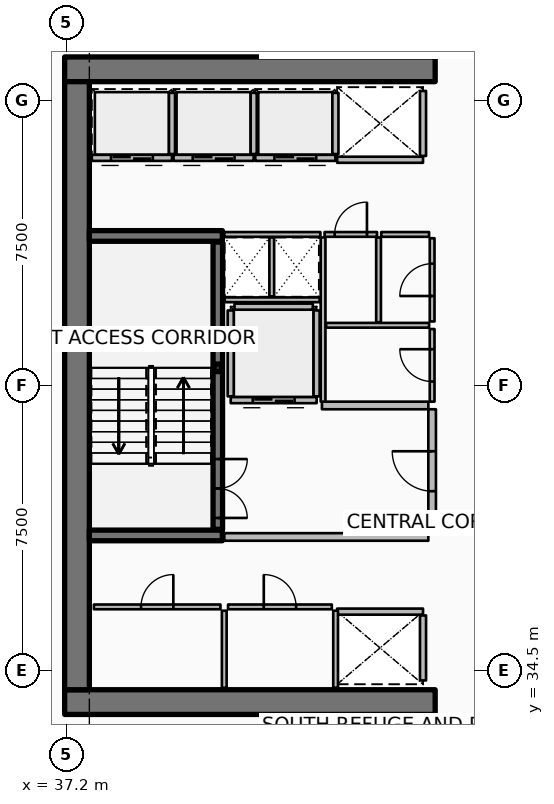
"""IFC4 building model, lengths in metres.
Left out: names, types, materials, properties, quantities, classifications, styles, units other than length and angle.
Written with IfcOpenShell. Run it as: python <this file> out.ifc"""

import sys

from ifc_helpers import new_model, si_unit, direction, frame, frame_2d, origin, origin_2d, place, context, subcontext, project, spatial, rectangle, hollow_rectangle, extrude, element, fill, save


model = new_model("IFC4")
c1 = context("Model", 3, precision=1e-05, world=origin(), true_north=direction((0.0, 1.0)))
c2 = subcontext(c1, "Body", "Model", "MODEL_VIEW")
j1 = project(units=[si_unit("LENGTHUNIT", "METRE"), si_unit("PLANEANGLEUNIT", "RADIAN")], contexts=[c1])
p1 = place(None, origin())
s1 = spatial("IfcSite", under=j1, at=p1, CompositionType="ELEMENT")
p2 = place(p1, origin())
s2 = spatial("IfcBuilding", under=s1, at=p2, CompositionType="ELEMENT")
p3 = place(p2, frame((0.0, 0.0, 225.3)))
s3 = spatial("IfcBuildingStorey", under=s2, at=p3, CompositionType="ELEMENT", Elevation=225.3)
for number, where, z_axis, x_axis in (
    (1, (37.15, 33.675, 0.0), (0.0, 0.0, 1.0), (1.0, 0.0, 0.0)),
    (2, (37.15, 50.325, 0.0), (0.0, 0.0, 1.0), (1.0, 0.0, 0.0)),
):
    element("IfcWall", number, at=place(p3, frame(where, z_axis=z_axis, x_axis=x_axis)), inside=s3, PredefinedType="SHEAR", context=c2, shape_type="SweptSolid", body=[
        extrude(rectangle(XDim=9.75, YDim=0.65, at=frame_2d((4.875, 0.0))), origin(), (0.0, 0.0, 1.0), 6.6),
    ])
p4 = place(p3, frame((37.475, 34.0, 0.0), z_axis=(0.0, 0.0, 1.0), x_axis=(0.0, 1.0, 0.0)))
e3 = element("IfcWall", 3, at=p4, inside=s3, PredefinedType="SHEAR", context=c2, shape_type="SweptSolid", body=[
    extrude(rectangle(XDim=16.0, YDim=0.65, at=frame_2d((8.0, 0.0))), origin(), (0.0, 0.0, 1.0), 6.6),
])
for number, where, z_axis, x_axis in (
    (4, (37.8, 38.06, 0.0), (0.0, 0.0, 1.0), (1.0, 0.0, 0.0)),
    (5, (37.8, 45.94, 0.0), (0.0, 0.0, 1.0), (1.0, 0.0, 0.0)),
):
    element("IfcWall", number, at=place(p3, frame(where, z_axis=z_axis, x_axis=x_axis)), inside=s3, PredefinedType="SHEAR", context=c2, shape_type="SweptSolid", body=[
        extrude(rectangle(XDim=3.5, YDim=0.28, at=frame_2d((1.75, 0.0))), origin(), (0.0, 0.0, 1.0), 6.6),
    ])
p5 = place(p3, frame((41.18, 42.47, 0.0), z_axis=(0.0, 0.0, 1.0), x_axis=(1.0, 0.0, 0.0)))
e6 = element("IfcColumn", 6, at=p5, inside=s3, PredefinedType="COLUMN", context=c2, shape_type="SweptSolid", body=[
    extrude(hollow_rectangle(XDim=0.2, YDim=0.2, WallThickness=0.01, InnerFilletRadius=0.01, OuterFilletRadius=0.02, at=origin_2d()), origin(), (0.0, 0.0, 1.0), 1.445),
])
p6 = place(p3, frame((41.18, 43.17, 0.0), z_axis=(0.0, 0.0, 1.0), x_axis=(1.0, 0.0, 0.0)))
e7 = element("IfcColumn", 7, at=p6, inside=s3, PredefinedType="COLUMN", context=c2, shape_type="SweptSolid", body=[
    extrude(hollow_rectangle(XDim=0.2, YDim=0.2, WallThickness=0.01, InnerFilletRadius=0.01, OuterFilletRadius=0.02, at=origin_2d()), origin(), (0.0, 0.0, 1.0), 4.745),
])
p7 = place(p3, frame((41.18, 38.22, 0.0), z_axis=(0.0, 0.0, 1.0), x_axis=(0.0, 1.0, 0.0)))
e8 = element("IfcWall", 8, at=p7, inside=s3, PredefinedType="SOLIDWALL", context=c2, shape_type="SweptSolid", body=[
    extrude(rectangle(XDim=7.56, YDim=0.25, at=frame_2d((3.78, 0.0))), origin(), (0.0, 0.0, 1.0), 6.28),
])
p8 = place(p7, frame((0.3, 0.0, 0.0)))
e9 = element("IfcOpeningElement", 9, at=p8, cuts=e8, PredefinedType="OPENING", context=c2, shape_type="SweptSolid", body=[
    extrude(rectangle(XDim=1.55, YDim=2.15, at=frame_2d((0.775, 1.075))), frame((0.0, 0.135, 0.0), z_axis=(0.0, -1.0, 0.0), x_axis=(1.0, 0.0, 0.0)), (0.0, 0.0, 1.0), 0.27),
])
p9 = place(p3, frame((39.975, 47.995, 0.0), z_axis=(0.0, 0.0, 1.0), x_axis=(-1.0, 0.0, 0.0)))
e10 = element("IfcWall", 10, at=p9, inside=s3, PredefinedType="PARTITIONING", context=c2, shape_type="SweptSolid", body=[
    extrude(rectangle(XDim=2.11, YDim=0.16, at=frame_2d((1.055, 0.0))), origin(), (0.0, 0.0, 1.0), 6.28),
])
p10 = place(p9, frame((0.505, 0.0, 0.0)))
e11 = element("IfcOpeningElement", 11, at=p10, cuts=e10, PredefinedType="OPENING", context=c2, shape_type="SweptSolid", body=[
    extrude(rectangle(XDim=1.1, YDim=2.1, at=frame_2d((0.55, 1.05))), frame((0.0, 0.09, 0.0), z_axis=(0.0, -1.0, 0.0), x_axis=(1.0, 0.0, 0.0)), (0.0, 0.0, 1.0), 0.18),
])
p11 = place(p3, frame((39.975, 48.095, 0.0), z_axis=(0.0, 0.0, 1.0), x_axis=(0.0, 1.0, 0.0)))
e12 = element("IfcWall", 12, at=p11, inside=s3, PredefinedType="PARTITIONING", context=c2, shape_type="SweptSolid", body=[
    extrude(rectangle(XDim=1.61, YDim=0.16, at=frame_2d((0.805, 0.0))), origin(), (0.0, 0.0, 1.0), 6.28),
])
p12 = place(p3, frame((42.125, 47.995, 0.0), z_axis=(0.0, 0.0, 1.0), x_axis=(-1.0, 0.0, 0.0)))
e13 = element("IfcWall", 13, at=p12, inside=s3, PredefinedType="PARTITIONING", context=c2, shape_type="SweptSolid", body=[
    extrude(rectangle(XDim=2.11, YDim=0.16, at=frame_2d((1.055, 0.0))), origin(), (0.0, 0.0, 1.0), 6.28),
])
p13 = place(p12, frame((0.505, 0.0, 0.0)))
e14 = element("IfcOpeningElement", 14, at=p13, cuts=e13, PredefinedType="OPENING", context=c2, shape_type="SweptSolid", body=[
    extrude(rectangle(XDim=1.1, YDim=2.1, at=frame_2d((0.55, 1.05))), frame((0.0, 0.09, 0.0), z_axis=(0.0, -1.0, 0.0), x_axis=(1.0, 0.0, 0.0)), (0.0, 0.0, 1.0), 0.18),
])
p14 = place(p3, frame((42.125, 48.095, 0.0), z_axis=(0.0, 0.0, 1.0), x_axis=(0.0, 1.0, 0.0)))
e15 = element("IfcWall", 15, at=p14, inside=s3, PredefinedType="PARTITIONING", context=c2, shape_type="SweptSolid", body=[
    extrude(rectangle(XDim=1.61, YDim=0.16, at=frame_2d((0.805, 0.0))), origin(), (0.0, 0.0, 1.0), 6.28),
])
p15 = place(p3, frame((44.275, 47.995, 0.0), z_axis=(0.0, 0.0, 1.0), x_axis=(-1.0, 0.0, 0.0)))
e16 = element("IfcWall", 16, at=p15, inside=s3, PredefinedType="PARTITIONING", context=c2, shape_type="SweptSolid", body=[
    extrude(rectangle(XDim=2.11, YDim=0.16, at=frame_2d((1.055, 0.0))), origin(), (0.0, 0.0, 1.0), 6.28),
])
p16 = place(p15, frame((0.505, 0.0, 0.0)))
e17 = element("IfcOpeningElement", 17, at=p16, cuts=e16, PredefinedType="OPENING", context=c2, shape_type="SweptSolid", body=[
    extrude(rectangle(XDim=1.1, YDim=2.1, at=frame_2d((0.55, 1.05))), frame((0.0, 0.09, 0.0), z_axis=(0.0, -1.0, 0.0), x_axis=(1.0, 0.0, 0.0)), (0.0, 0.0, 1.0), 0.18),
])
p17 = place(p3, frame((44.275, 48.095, 0.0), z_axis=(0.0, 0.0, 1.0), x_axis=(0.0, 1.0, 0.0)))
e18 = element("IfcWall", 18, at=p17, inside=s3, PredefinedType="PARTITIONING", context=c2, shape_type="SweptSolid", body=[
    extrude(rectangle(XDim=1.61, YDim=0.16, at=frame_2d((0.805, 0.0))), origin(), (0.0, 0.0, 1.0), 6.28),
])
p18 = place(p3, frame((46.58, 47.945, 0.0), z_axis=(0.0, 0.0, 1.0), x_axis=(-1.0, 0.0, 0.0)))
e19 = element("IfcWall", 19, at=p18, inside=s3, PredefinedType="PARTITIONING", context=c2, shape_type="SweptSolid", body=[
    extrude(rectangle(XDim=2.26, YDim=0.16, at=frame_2d((1.13, 0.0))), origin(), (0.0, 0.0, 1.0), 6.28),
])
p19 = place(p3, frame((46.58, 48.045, 0.0), z_axis=(0.0, 0.0, 1.0), x_axis=(0.0, 1.0, 0.0)))
e20 = element("IfcWall", 20, at=p19, inside=s3, PredefinedType="PARTITIONING", context=c2, shape_type="SweptSolid", body=[
    extrude(rectangle(XDim=1.71, YDim=0.16, at=frame_2d((0.855, 0.0))), origin(), (0.0, 0.0, 1.0), 6.28),
])
p20 = place(p3, frame((44.32, 36.055, 0.0), z_axis=(0.0, 0.0, 1.0), x_axis=(1.0, 0.0, 0.0)))
e21 = element("IfcWall", 21, at=p20, inside=s3, PredefinedType="PARTITIONING", context=c2, shape_type="SweptSolid", body=[
    extrude(rectangle(XDim=2.26, YDim=0.16, at=frame_2d((1.13, 0.0))), origin(), (0.0, 0.0, 1.0), 6.28),
])
p21 = place(p3, frame((46.58, 34.245, 0.0), z_axis=(0.0, 0.0, 1.0), x_axis=(0.0, 1.0, 0.0)))
e22 = element("IfcWall", 22, at=p21, inside=s3, PredefinedType="PARTITIONING", context=c2, shape_type="SweptSolid", body=[
    extrude(rectangle(XDim=1.71, YDim=0.16, at=frame_2d((0.855, 0.0))), origin(), (0.0, 0.0, 1.0), 6.28),
])
p22 = place(p3, frame((43.78, 41.62, 0.0), z_axis=(0.0, 0.0, 1.0), x_axis=(-1.0, 0.0, 0.0)))
e23 = element("IfcWall", 23, at=p22, inside=s3, PredefinedType="PARTITIONING", context=c2, shape_type="SweptSolid", body=[
    extrude(rectangle(XDim=2.26, YDim=0.16, at=frame_2d((1.13, 0.0))), origin(), (0.0, 0.0, 1.0), 6.28),
])
p23 = place(p22, frame((0.58, 0.0, 0.0)))
e24 = element("IfcOpeningElement", 24, at=p23, cuts=e23, PredefinedType="OPENING", context=c2, shape_type="SweptSolid", body=[
    extrude(rectangle(XDim=1.1, YDim=2.1, at=frame_2d((0.55, 1.05))), frame((0.0, 0.09, 0.0), z_axis=(0.0, -1.0, 0.0), x_axis=(1.0, 0.0, 0.0)), (0.0, 0.0, 1.0), 0.18),
])
for number, where, z_axis, x_axis in (
    (25, (43.78, 41.72, 0.0), (0.0, 0.0, 1.0), (0.0, 1.0, 0.0)),
    (26, (41.52, 41.72, 0.0), (0.0, 0.0, 1.0), (0.0, 1.0, 0.0)),
):
    element("IfcWall", number, at=place(p3, frame(where, z_axis=z_axis, x_axis=x_axis)), inside=s3, PredefinedType="PARTITIONING", context=c2, shape_type="SweptSolid", body=[
        extrude(rectangle(XDim=2.26, YDim=0.16, at=frame_2d((1.13, 0.0))), origin(), (0.0, 0.0, 1.0), 6.28),
    ])
p24 = place(p3, frame((41.62, 44.08, 0.0), z_axis=(0.0, 0.0, 1.0), x_axis=(1.0, 0.0, 0.0)))
e27 = element("IfcWall", 27, at=p24, inside=s3, PredefinedType="PARTITIONING", context=c2, shape_type="SweptSolid", body=[
    extrude(rectangle(XDim=2.06, YDim=0.16, at=frame_2d((1.03, 0.0))), origin(), (0.0, 0.0, 1.0), 6.28),
])
for number, where, z_axis, x_axis in (
    (28, (44.28, 34.05, 0.0), (0.0, 0.0, 1.0), (0.0, 1.0, 0.0)),
    (29, (41.35, 34.05, 0.0), (0.0, 0.0, 1.0), (0.0, 1.0, 0.0)),
):
    element("IfcWall", number, at=place(p3, frame(where, z_axis=z_axis, x_axis=x_axis)), inside=s3, PredefinedType="PARTITIONING", context=c2, shape_type="SweptSolid", body=[
        extrude(rectangle(XDim=2.03, YDim=0.125, at=frame_2d((1.015, 0.0))), origin(), (0.0, 0.0, 1.0), 5.72),
    ])
p25 = place(p3, frame((37.92, 36.18, 0.0), z_axis=(0.0, 0.0, 1.0), x_axis=(1.0, 0.0, 0.0)))
e30 = element("IfcWall", 30, at=p25, inside=s3, PredefinedType="PARTITIONING", context=c2, shape_type="SweptSolid", body=[
    extrude(rectangle(XDim=3.33, YDim=0.125, at=frame_2d((1.665, 0.0))), origin(), (0.0, 0.0, 1.0), 5.72),
])
p26 = place(p25, frame((1.24, 0.0, 0.0)))
e31 = element("IfcOpeningElement", 31, at=p26, cuts=e30, PredefinedType="OPENING", context=c2, shape_type="SweptSolid", body=[
    extrude(rectangle(XDim=0.85, YDim=2.06, at=frame_2d((0.425, 1.03))), frame((0.0, 0.073, 0.0), z_axis=(0.0, -1.0, 0.0), x_axis=(1.0, 0.0, 0.0)), (0.0, 0.0, 1.0), 0.145),
])
p27 = place(p3, frame((41.45, 36.18, 0.0), z_axis=(0.0, 0.0, 1.0), x_axis=(1.0, 0.0, 0.0)))
e32 = element("IfcWall", 32, at=p27, inside=s3, PredefinedType="PARTITIONING", context=c2, shape_type="SweptSolid", body=[
    extrude(rectangle(XDim=2.73, YDim=0.125, at=frame_2d((1.365, 0.0))), origin(), (0.0, 0.0, 1.0), 5.72),
])
p28 = place(p27, frame((0.94, 0.0, 0.0)))
e33 = element("IfcOpeningElement", 33, at=p28, cuts=e32, PredefinedType="OPENING", context=c2, shape_type="SweptSolid", body=[
    extrude(rectangle(XDim=0.85, YDim=2.06, at=frame_2d((0.425, 1.03))), frame((0.0, 0.073, 0.0), z_axis=(0.0, -1.0, 0.0), x_axis=(1.0, 0.0, 0.0)), (0.0, 0.0, 1.0), 0.145),
])
p29 = place(p3, frame((41.35, 38.02, 0.0), z_axis=(0.0, 0.0, 1.0), x_axis=(1.0, 0.0, 0.0)))
e34 = element("IfcWall", 34, at=p29, inside=s3, PredefinedType="PARTITIONING", context=c2, shape_type="SweptSolid", body=[
    extrude(rectangle(XDim=5.37, YDim=0.2, at=frame_2d((2.685, 0.0))), origin(), (0.0, 0.0, 1.0), 6.28),
])
p30 = place(p3, frame((43.92, 41.48, 0.0), z_axis=(0.0, 0.0, 1.0), x_axis=(1.0, 0.0, 0.0)))
e35 = element("IfcWall", 35, at=p30, inside=s3, PredefinedType="PARTITIONING", context=c2, shape_type="SweptSolid", body=[
    extrude(rectangle(XDim=2.8, YDim=0.2, at=frame_2d((1.4, 0.0))), origin(), (0.0, 0.0, 1.0), 6.28),
])
p31 = place(p3, frame((46.82, 38.12, 0.0), z_axis=(0.0, 0.0, 1.0), x_axis=(0.0, 1.0, 0.0)))
e36 = element("IfcWall", 36, at=p31, inside=s3, PredefinedType="PARTITIONING", context=c2, shape_type="SweptSolid", body=[
    extrude(rectangle(XDim=3.26, YDim=0.2, at=frame_2d((1.63, 0.0))), origin(), (0.0, 0.0, 1.0), 6.28),
])
p32 = place(p31, frame((1.105, 0.0, 0.0)))
e37 = element("IfcOpeningElement", 37, at=p32, cuts=e36, PredefinedType="OPENING", context=c2, shape_type="SweptSolid", body=[
    extrude(rectangle(XDim=1.05, YDim=2.1, at=frame_2d((0.525, 1.05))), frame((0.0, 0.11, 0.0), z_axis=(0.0, -1.0, 0.0), x_axis=(1.0, 0.0, 0.0)), (0.0, 0.0, 1.0), 0.22),
])
p33 = place(p3, frame((41.36, 44.26, 0.0), z_axis=(0.0, 0.0, 1.0), x_axis=(1.0, 0.0, 0.0)))
e38 = element("IfcWall", 38, at=p33, inside=s3, PredefinedType="PARTITIONING", context=c2, shape_type="SweptSolid", body=[
    extrude(rectangle(XDim=2.5, YDim=0.125, at=frame_2d((1.25, 0.0))), origin(), (0.0, 0.0, 1.0), 5.72),
])
p34 = place(p3, frame((42.6, 44.35, 0.0), z_axis=(0.0, 0.0, 1.0), x_axis=(0.0, 1.0, 0.0)))
e39 = element("IfcWall", 39, at=p34, inside=s3, PredefinedType="PARTITIONING", context=c2, shape_type="SweptSolid", body=[
    extrude(rectangle(XDim=1.55, YDim=0.125, at=frame_2d((0.775, 0.0))), origin(), (0.0, 0.0, 1.0), 5.72),
])
p35 = place(p3, frame((43.95, 41.58, 0.0), z_axis=(0.0, 0.0, 1.0), x_axis=(0.0, 1.0, 0.0)))
e40 = element("IfcWall", 40, at=p35, inside=s3, PredefinedType="PARTITIONING", context=c2, shape_type="SweptSolid", body=[
    extrude(rectangle(XDim=4.32, YDim=0.125, at=frame_2d((2.16, 0.0))), origin(), (0.0, 0.0, 1.0), 5.72),
])
p36 = place(p3, frame((44.03, 43.59, 0.0), z_axis=(0.0, 0.0, 1.0), x_axis=(1.0, 0.0, 0.0)))
e41 = element("IfcWall", 41, at=p36, inside=s3, PredefinedType="PARTITIONING", context=c2, shape_type="SweptSolid", body=[
    extrude(rectangle(XDim=2.71, YDim=0.125, at=frame_2d((1.355, 0.0))), origin(), (0.0, 0.0, 1.0), 5.72),
])
p37 = place(p3, frame((45.41, 43.67, 0.0), z_axis=(0.0, 0.0, 1.0), x_axis=(0.0, 1.0, 0.0)))
e42 = element("IfcWall", 42, at=p37, inside=s3, PredefinedType="PARTITIONING", context=c2, shape_type="SweptSolid", body=[
    extrude(rectangle(XDim=2.23, YDim=0.125, at=frame_2d((1.115, 0.0))), origin(), (0.0, 0.0, 1.0), 5.72),
])
p38 = place(p3, frame((46.82, 41.58, 0.0), z_axis=(0.0, 0.0, 1.0), x_axis=(0.0, 1.0, 0.0)))
e43 = element("IfcWall", 43, at=p38, inside=s3, PredefinedType="PARTITIONING", context=c2, shape_type="SweptSolid", body=[
    extrude(rectangle(XDim=1.91, YDim=0.125, at=frame_2d((0.955, 0.0))), origin(), (0.0, 0.0, 1.0), 5.72),
])
p39 = place(p38, frame((0.53, 0.0, 0.0)))
e44 = element("IfcOpeningElement", 44, at=p39, cuts=e43, PredefinedType="OPENING", context=c2, shape_type="SweptSolid", body=[
    extrude(rectangle(XDim=0.85, YDim=2.06, at=frame_2d((0.425, 1.03))), frame((0.0, 0.073, 0.0), z_axis=(0.0, -1.0, 0.0), x_axis=(1.0, 0.0, 0.0)), (0.0, 0.0, 1.0), 0.145),
])
p40 = place(p3, frame((46.82, 43.69, 0.0), z_axis=(0.0, 0.0, 1.0), x_axis=(0.0, 1.0, 0.0)))
e45 = element("IfcWall", 45, at=p40, inside=s3, PredefinedType="PARTITIONING", context=c2, shape_type="SweptSolid", body=[
    extrude(rectangle(XDim=2.19, YDim=0.125, at=frame_2d((1.095, 0.0))), origin(), (0.0, 0.0, 1.0), 5.72),
])
p41 = place(p40, frame((0.67, 0.0, 0.0)))
e46 = element("IfcOpeningElement", 46, at=p41, cuts=e45, PredefinedType="OPENING", context=c2, shape_type="SweptSolid", body=[
    extrude(rectangle(XDim=0.85, YDim=2.06, at=frame_2d((0.425, 1.03))), frame((0.0, 0.073, 0.0), z_axis=(0.0, -1.0, 0.0), x_axis=(1.0, 0.0, 0.0)), (0.0, 0.0, 1.0), 0.145),
])
p42 = place(p3, frame((41.35, 45.98, 0.0), z_axis=(0.0, 0.0, 1.0), x_axis=(1.0, 0.0, 0.0)))
e47 = element("IfcWall", 47, at=p42, inside=s3, PredefinedType="PARTITIONING", context=c2, shape_type="SweptSolid", body=[
    extrude(rectangle(XDim=2.53, YDim=0.125, at=frame_2d((1.265, 0.0))), origin(), (0.0, 0.0, 1.0), 5.72),
])
p43 = place(p3, frame((43.99, 45.98, 0.0), z_axis=(0.0, 0.0, 1.0), x_axis=(1.0, 0.0, 0.0)))
e48 = element("IfcWall", 48, at=p43, inside=s3, PredefinedType="PARTITIONING", context=c2, shape_type="SweptSolid", body=[
    extrude(rectangle(XDim=1.38, YDim=0.125, at=frame_2d((0.69, 0.0))), origin(), (0.0, 0.0, 1.0), 5.72),
])
p44 = place(p43, frame((0.265, 0.0, 0.0)))
e49 = element("IfcOpeningElement", 49, at=p44, cuts=e48, PredefinedType="OPENING", context=c2, shape_type="SweptSolid", body=[
    extrude(rectangle(XDim=0.85, YDim=2.06, at=frame_2d((0.425, 1.03))), frame((0.0, 0.073, 0.0), z_axis=(0.0, -1.0, 0.0), x_axis=(1.0, 0.0, 0.0)), (0.0, 0.0, 1.0), 0.145),
])
p45 = place(p3, frame((45.48, 45.98, 0.0), z_axis=(0.0, 0.0, 1.0), x_axis=(1.0, 0.0, 0.0)))
e50 = element("IfcWall", 50, at=p45, inside=s3, PredefinedType="PARTITIONING", context=c2, shape_type="SweptSolid", body=[
    extrude(rectangle(XDim=1.26, YDim=0.125, at=frame_2d((0.63, 0.0))), origin(), (0.0, 0.0, 1.0), 5.72),
])
p46 = place(p8, origin())
e51 = element("IfcDoor", 51, at=p46, inside=s3, OperationType="DOUBLE_DOOR_SINGLE_SWING", PredefinedType="DOOR", context=c2, shape_type="SweptSolid", body=[
    extrude(rectangle(XDim=1.55, YDim=2.15, at=frame_2d((0.775, 1.075))), frame((0.0, 0.025, 0.0), z_axis=(0.0, -1.0, 0.0), x_axis=(1.0, 0.0, 0.0)), (0.0, 0.0, 1.0), 0.05),
])
fill(e9, e51)
p47 = place(p10, origin())
e52 = element("IfcDoor", 52, at=p47, inside=s3, OperationType="DOUBLE_DOOR_SLIDING", PredefinedType="DOOR", context=c2, shape_type="SweptSolid", body=[
    extrude(rectangle(XDim=1.1, YDim=2.1, at=frame_2d((0.55, 1.05))), frame((0.0, 0.025, 0.0), z_axis=(0.0, -1.0, 0.0), x_axis=(1.0, 0.0, 0.0)), (0.0, 0.0, 1.0), 0.05),
])
fill(e11, e52)
p48 = place(p13, origin())
e53 = element("IfcDoor", 53, at=p48, inside=s3, OperationType="DOUBLE_DOOR_SLIDING", PredefinedType="DOOR", context=c2, shape_type="SweptSolid", body=[
    extrude(rectangle(XDim=1.1, YDim=2.1, at=frame_2d((0.55, 1.05))), frame((0.0, 0.025, 0.0), z_axis=(0.0, -1.0, 0.0), x_axis=(1.0, 0.0, 0.0)), (0.0, 0.0, 1.0), 0.05),
])
fill(e14, e53)
p49 = place(p16, origin())
e54 = element("IfcDoor", 54, at=p49, inside=s3, OperationType="DOUBLE_DOOR_SLIDING", PredefinedType="DOOR", context=c2, shape_type="SweptSolid", body=[
    extrude(rectangle(XDim=1.1, YDim=2.1, at=frame_2d((0.55, 1.05))), frame((0.0, 0.025, 0.0), z_axis=(0.0, -1.0, 0.0), x_axis=(1.0, 0.0, 0.0)), (0.0, 0.0, 1.0), 0.05),
])
fill(e17, e54)
p50 = place(p23, origin())
e55 = element("IfcDoor", 55, at=p50, inside=s3, OperationType="DOUBLE_DOOR_SLIDING", PredefinedType="DOOR", context=c2, shape_type="SweptSolid", body=[
    extrude(rectangle(XDim=1.1, YDim=2.1, at=frame_2d((0.55, 1.05))), frame((0.0, 0.025, 0.0), z_axis=(0.0, -1.0, 0.0), x_axis=(1.0, 0.0, 0.0)), (0.0, 0.0, 1.0), 0.05),
])
fill(e24, e55)
p51 = place(p26, origin())
e56 = element("IfcDoor", 56, at=p51, inside=s3, OperationType="SINGLE_SWING_RIGHT", PredefinedType="DOOR", context=c2, shape_type="SweptSolid", body=[
    extrude(rectangle(XDim=0.85, YDim=2.06, at=frame_2d((0.425, 1.03))), frame((0.0, 0.025, 0.0), z_axis=(0.0, -1.0, 0.0), x_axis=(1.0, 0.0, 0.0)), (0.0, 0.0, 1.0), 0.05),
])
fill(e31, e56)
p52 = place(p28, origin())
e57 = element("IfcDoor", 57, at=p52, inside=s3, OperationType="SINGLE_SWING_LEFT", PredefinedType="DOOR", context=c2, shape_type="SweptSolid", body=[
    extrude(rectangle(XDim=0.85, YDim=2.06, at=frame_2d((0.425, 1.03))), frame((0.0, 0.025, 0.0), z_axis=(0.0, -1.0, 0.0), x_axis=(1.0, 0.0, 0.0)), (0.0, 0.0, 1.0), 0.05),
])
fill(e33, e57)
p53 = place(p32, origin())
e58 = element("IfcDoor", 58, at=p53, inside=s3, OperationType="SINGLE_SWING_RIGHT", PredefinedType="DOOR", context=c2, shape_type="SweptSolid", body=[
    extrude(rectangle(XDim=1.05, YDim=2.1, at=frame_2d((0.525, 1.05))), frame((0.0, 0.025, 0.0), z_axis=(0.0, -1.0, 0.0), x_axis=(1.0, 0.0, 0.0)), (0.0, 0.0, 1.0), 0.05),
])
fill(e37, e58)
p54 = place(p39, origin())
e59 = element("IfcDoor", 59, at=p54, inside=s3, OperationType="SINGLE_SWING_RIGHT", PredefinedType="DOOR", context=c2, shape_type="SweptSolid", body=[
    extrude(rectangle(XDim=0.85, YDim=2.06, at=frame_2d((0.425, 1.03))), frame((0.0, 0.025, 0.0), z_axis=(0.0, -1.0, 0.0), x_axis=(1.0, 0.0, 0.0)), (0.0, 0.0, 1.0), 0.05),
])
fill(e44, e59)
p55 = place(p41, origin())
e60 = element("IfcDoor", 60, at=p55, inside=s3, OperationType="SINGLE_SWING_LEFT", PredefinedType="DOOR", context=c2, shape_type="SweptSolid", body=[
    extrude(rectangle(XDim=0.85, YDim=2.06, at=frame_2d((0.425, 1.03))), frame((0.0, 0.025, 0.0), z_axis=(0.0, -1.0, 0.0), x_axis=(1.0, 0.0, 0.0)), (0.0, 0.0, 1.0), 0.05),
])
fill(e46, e60)
p56 = place(p44, origin())
e61 = element("IfcDoor", 61, at=p56, inside=s3, OperationType="SINGLE_SWING_RIGHT", PredefinedType="DOOR", context=c2, shape_type="SweptSolid", body=[
    extrude(rectangle(XDim=0.85, YDim=2.06, at=frame_2d((0.425, 1.03))), frame((0.0, 0.025, 0.0), z_axis=(0.0, -1.0, 0.0), x_axis=(1.0, 0.0, 0.0)), (0.0, 0.0, 1.0), 0.05),
])
fill(e49, e61)
save(model, sys.argv[1])
